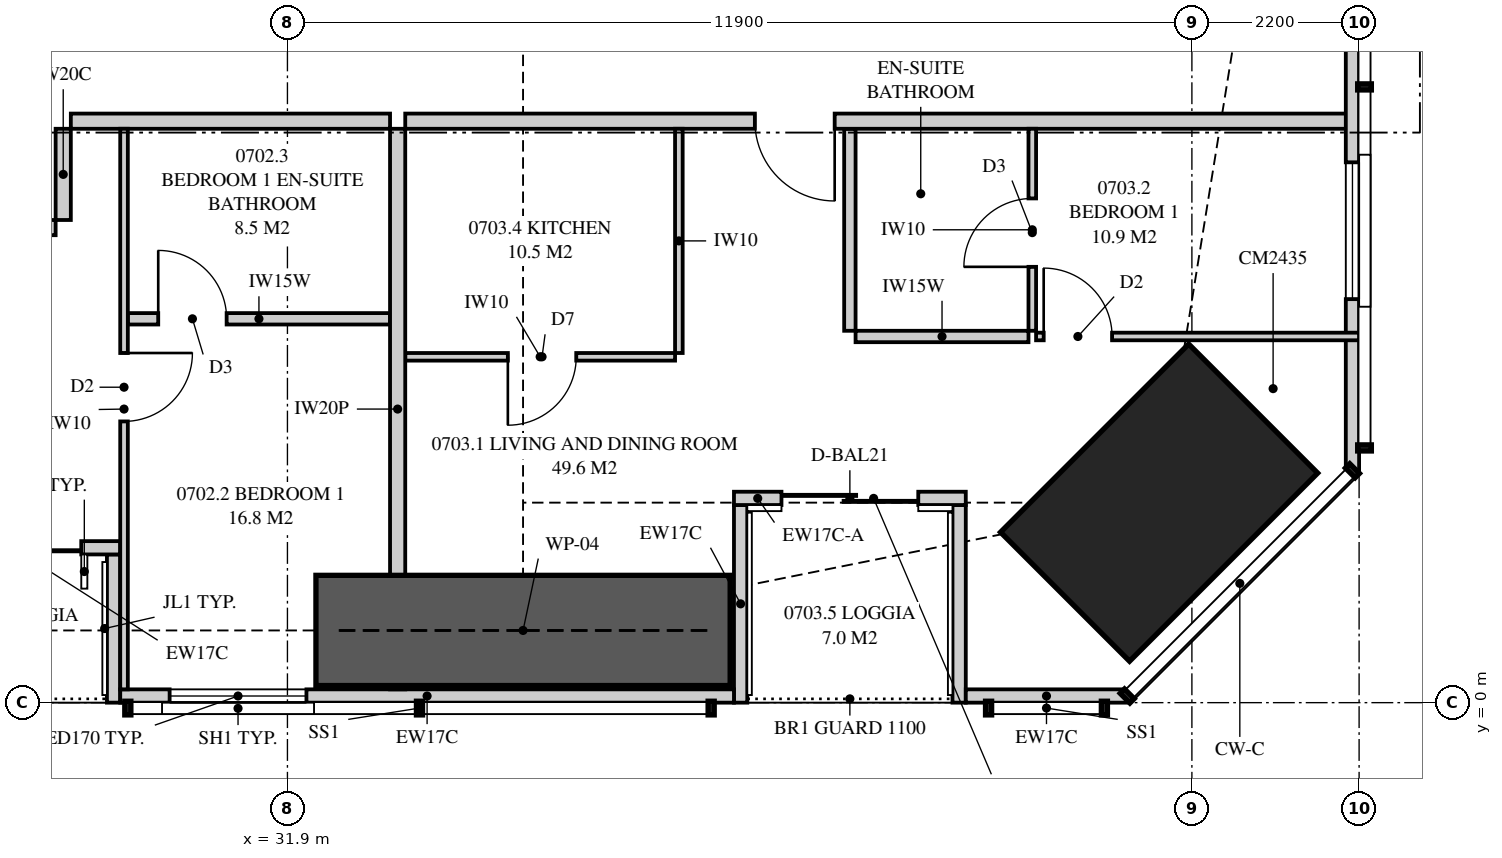
"""IFC4 building model, lengths in metres.
Left out: names, types, materials, properties, quantities, classifications, styles, units other than length and angle.
Written with IfcOpenShell. Run it as: python <this file> out.ifc"""

import sys

from ifc_helpers import new_model, si_unit, direction, frame, frame_2d, origin, origin_2d, place, context, subcontext, project, spatial, polyline, rectangle, outline, extrude, element, fill, save


model = new_model("IFC4")
c1 = context("Model", 3, precision=1e-05, world=origin(), true_north=direction((0.0, 1.0)))
c2 = subcontext(c1, "Body", "Model", "MODEL_VIEW")
j1 = project(units=[si_unit("LENGTHUNIT", "METRE"), si_unit("PLANEANGLEUNIT", "RADIAN")], contexts=[c1])
p1 = place(None, origin())
s1 = spatial("IfcSite", under=j1, at=p1, CompositionType="ELEMENT")
p2 = place(p1, origin())
s2 = spatial("IfcBuilding", under=s1, at=p2, CompositionType="ELEMENT")
p3 = place(p2, frame((0.0, 0.0, 31.05)))
s3 = spatial("IfcBuildingStorey", under=s2, at=p3, CompositionType="ELEMENT", Elevation=31.05)
p4 = place(p3, frame((43.369, 2.631, 0.0), z_axis=(0.0, 0.0, 1.0), x_axis=(-0.707106781187, 0.707106781187, 0.0)))
e1 = element("IfcColumn", 1, at=p4, inside=s3, PredefinedType="COLUMN", context=c2, shape_type="SweptSolid", body=[
    extrude(rectangle(XDim=2.4, YDim=3.5, at=origin_2d()), origin(), (0.0, 0.0, 1.0), 3.35),
])
p5 = place(p3, frame((29.7, 0.087, 0.0), z_axis=(0.0, 0.0, 1.0), x_axis=(1.0, 0.0, 0.0)))
e2 = element("IfcWall", 2, at=p5, inside=s3, PredefinedType="SOLIDWALL", context=c2, shape_type="SweptSolid", body=[
    extrude(outline(polyline([(0.0, 0.0), (8.075, 0.0), (8.075, 3.11), (5.504, 3.11), (5.504, 2.15), (5.456, 2.15), (5.456, 3.11), (5.3, 3.11), (5.3, 2.15), (0.0, 2.15), (0.0, 0.0)])), frame((0.0, 0.087, 0.0), z_axis=(0.0, -1.0, 0.0), x_axis=(1.0, 0.0, 0.0)), (0.0, 0.0, 1.0), 0.175),
])
p6 = place(p5, frame((0.65, 0.0, 0.4)))
e3 = element("IfcOpeningElement", 3, at=p6, cuts=e2, PredefinedType="OPENING", context=c2, shape_type="SweptSolid", body=[
    extrude(rectangle(XDim=1.8, YDim=1.7, at=frame_2d((0.9, 0.85))), frame((0.0, 0.097, 0.0), z_axis=(0.0, -1.0, 0.0), x_axis=(1.0, 0.0, 0.0)), (0.0, 0.0, 1.0), 0.195),
])
p7 = place(p3, frame((40.825, 0.087, 0.0), z_axis=(0.0, 0.0, 1.0), x_axis=(1.0, 0.0, 0.0)))
e4 = element("IfcWall", 4, at=p7, inside=s3, PredefinedType="SOLIDWALL", context=c2, shape_type="SweptSolid", body=[
    extrude(rectangle(XDim=2.124, YDim=0.175, at=frame_2d((1.062, 0.0))), origin(), (0.0, 0.0, 1.0), 3.11),
])
p8 = place(p3, frame((26.875, 2.038, 0.0), z_axis=(0.0, 0.0, 1.0), x_axis=(1.0, 0.0, 0.0)))
e5 = element("IfcWall", 5, at=p8, inside=s3, PredefinedType="SOLIDWALL", context=c2, shape_type="SweptSolid", body=[
    extrude(rectangle(XDim=2.825, YDim=0.175, at=frame_2d((1.413, 0.0))), origin(), (0.0, 0.0, 1.0), 3.11),
])
p9 = place(p8, frame((0.512, 0.0, 0.0)))
e6 = element("IfcOpeningElement", 6, at=p9, cuts=e5, PredefinedType="OPENING", context=c2, shape_type="SweptSolid", body=[
    extrude(rectangle(XDim=1.8, YDim=2.1, at=frame_2d((0.9, 1.05))), frame((0.0, 0.097, 0.0), z_axis=(0.0, -1.0, 0.0), x_axis=(1.0, 0.0, 0.0)), (0.0, 0.0, 1.0), 0.195),
])
p10 = place(p3, frame((29.613, 0.0, 0.0), z_axis=(0.0, 0.0, 1.0), x_axis=(0.0, 1.0, 0.0)))
e7 = element("IfcWall", 7, at=p10, inside=s3, PredefinedType="SOLIDWALL", context=c2, shape_type="SweptSolid", body=[
    extrude(outline(polyline([(0.0, 0.0), (1.95, 0.0), (1.95, 3.11), (1.75, 3.11), (1.75, 2.15), (0.15, 2.15), (0.15, 3.11), (0.0, 3.11), (0.0, 0.0)])), frame((0.0, 0.087, 0.0), z_axis=(0.0, -1.0, 0.0), x_axis=(1.0, 0.0, 0.0)), (0.0, 0.0, 1.0), 0.175),
])
p11 = place(p3, frame((37.775, 2.688, 0.0), z_axis=(0.0, 0.0, 1.0), x_axis=(1.0, 0.0, 0.0)))
e8 = element("IfcWall", 8, at=p11, inside=s3, PredefinedType="SOLIDWALL", context=c2, shape_type="SweptSolid", body=[
    extrude(rectangle(XDim=0.625, YDim=0.175, at=frame_2d((0.312, 0.0))), origin(), (0.0, 0.0, 1.0), 2.51),
])
p12 = place(p3, frame((38.4, 2.688, 0.0), z_axis=(0.0, 0.0, 1.0), x_axis=(1.0, 0.0, 0.0)))
e9 = element("IfcWall", 9, at=p12, inside=s3, PredefinedType="SOLIDWALL", context=c2, shape_type="SweptSolid", body=[
    extrude(rectangle(XDim=2.425, YDim=0.175, at=frame_2d((1.212, 0.0))), origin(), (0.0, 0.0, 1.0), 2.15),
])
p13 = place(p12, origin())
e10 = element("IfcOpeningElement", 10, at=p13, cuts=e9, PredefinedType="OPENING", context=c2, shape_type="SweptSolid", body=[
    extrude(rectangle(XDim=1.8, YDim=2.1, at=frame_2d((0.9, 1.05))), frame((0.0, 0.097, 0.0), z_axis=(0.0, -1.0, 0.0), x_axis=(1.0, 0.0, 0.0)), (0.0, 0.0, 1.0), 0.195),
])
p14 = place(p3, frame((37.863, 0.0, 0.0), z_axis=(0.0, 0.0, 1.0), x_axis=(0.0, 1.0, 0.0)))
e11 = element("IfcWall", 11, at=p14, inside=s3, PredefinedType="SOLIDWALL", context=c2, shape_type="SweptSolid", body=[
    extrude(outline(polyline([(0.0, 0.0), (2.6, 0.0), (2.6, 2.51), (2.359, 2.51), (2.359, 2.15), (0.692, 2.15), (0.692, 3.11), (0.0, 3.11), (0.0, 0.0)])), frame((0.0, 0.087, 0.0), z_axis=(0.0, -1.0, 0.0), x_axis=(1.0, 0.0, 0.0)), (0.0, 0.0, 1.0), 0.175),
])
p15 = place(p3, frame((40.738, 0.0, 0.0), z_axis=(0.0, 0.0, 1.0), x_axis=(0.0, 1.0, 0.0)))
e12 = element("IfcWall", 12, at=p15, inside=s3, PredefinedType="SOLIDWALL", context=c2, shape_type="SweptSolid", body=[
    extrude(outline(polyline([(0.0, 0.0), (2.6, 0.0), (2.6, 2.15), (1.269, 2.15), (1.269, 3.11), (0.0, 3.11), (0.0, 0.0)])), frame((0.0, 0.087, 0.0), z_axis=(0.0, -1.0, 0.0), x_axis=(1.0, 0.0, 0.0)), (0.0, 0.0, 1.0), 0.175),
])
p16 = place(p3, frame((45.913, 3.051, 0.0), z_axis=(0.0, 0.0, 1.0), x_axis=(0.0, 1.0, 0.0)))
e13 = element("IfcWall", 13, at=p16, inside=s3, PredefinedType="SOLIDWALL", context=c2, shape_type="SweptSolid", body=[
    extrude(outline(polyline([(0.0, 0.0), (31.897, 0.0), (31.897, 3.11), (22.167, 3.11), (22.167, 2.15), (22.074, 2.15), (22.074, 3.11), (21.949, 3.11), (21.949, 2.15), (9.949, 2.15), (9.949, 3.11), (9.823, 3.11), (9.823, 2.15), (9.73, 2.15), (9.73, 3.11), (0.0, 3.11), (0.0, 0.0)])), frame((0.0, 0.087, 0.0), z_axis=(0.0, -1.0, 0.0), x_axis=(1.0, 0.0, 0.0)), (0.0, 0.0, 1.0), 0.175),
])
p17 = place(p16, frame((2.257, 0.0, 0.4)))
e14 = element("IfcOpeningElement", 14, at=p17, cuts=e13, PredefinedType="OPENING", context=c2, shape_type="SweptSolid", body=[
    extrude(rectangle(XDim=1.8, YDim=1.7, at=frame_2d((0.9, 0.85))), frame((0.0, 0.097, 0.0), z_axis=(0.0, -1.0, 0.0), x_axis=(1.0, 0.0, 0.0)), (0.0, 0.0, 1.0), 0.195),
])
p18 = place(p16, frame((14.849, 0.0, 0.4)))
e15 = element("IfcOpeningElement", 15, at=p18, cuts=e13, PredefinedType="OPENING", context=c2, shape_type="SweptSolid", body=[
    extrude(rectangle(XDim=1.2, YDim=1.7, at=frame_2d((0.6, 0.85))), frame((0.0, 0.097, 0.0), z_axis=(0.0, -1.0, 0.0), x_axis=(1.0, 0.0, 0.0)), (0.0, 0.0, 1.0), 0.195),
])
p19 = place(p16, frame((27.34, 0.0, 0.4)))
e16 = element("IfcOpeningElement", 16, at=p19, cuts=e13, PredefinedType="OPENING", context=c2, shape_type="SweptSolid", body=[
    extrude(rectangle(XDim=1.8, YDim=1.7, at=frame_2d((0.9, 0.85))), frame((0.0, 0.097, 0.0), z_axis=(0.0, -1.0, 0.0), x_axis=(1.0, 0.0, 0.0)), (0.0, 0.0, 1.0), 0.195),
])
p20 = place(p3, frame((33.35, 0.175, 0.0), z_axis=(0.0, 0.0, 1.0), x_axis=(0.0, 1.0, 0.0)))
e17 = element("IfcWall", 17, at=p20, inside=s3, PredefinedType="PARTITIONING", context=c2, shape_type="SweptSolid", body=[
    extrude(outline(polyline([(0.529, 2.15), (0.0, 2.15), (0.0, 0.0), (0.529, 0.0), (0.529, 0.366), (1.021, 0.366), (1.021, 0.0), (7.375, 0.0), (7.375, 3.11), (1.685, 3.11), (1.685, 2.15), (1.021, 2.15), (1.021, 1.784), (0.529, 1.784), (0.529, 2.15)])), frame((0.0, 0.1, 0.0), z_axis=(0.0, -1.0, 0.0), x_axis=(1.0, 0.0, 0.0)), (0.0, 0.0, 1.0), 0.2),
])
p21 = place(p3, frame((29.75, 0.175, 0.0), z_axis=(0.0, 0.0, 1.0), x_axis=(0.0, 1.0, 0.0)))
e18 = element("IfcWall", 18, at=p21, inside=s3, PredefinedType="PARTITIONING", context=c2, shape_type="SweptSolid", body=[
    extrude(outline(polyline([(0.0, 0.0), (7.375, 0.0), (7.375, 3.11), (1.635, 3.11), (1.635, 2.15), (0.0, 2.15), (0.0, 3.11), (0.0, 0.0)])), frame((0.0, 0.05, 0.0), z_axis=(0.0, -1.0, 0.0), x_axis=(1.0, 0.0, 0.0)), (0.0, 0.0, 1.0), 0.1),
])
p22 = place(p21, frame((3.525, 0.0, 0.0)))
e19 = element("IfcOpeningElement", 19, at=p22, cuts=e18, PredefinedType="OPENING", context=c2, shape_type="SweptSolid", body=[
    extrude(rectangle(XDim=0.9, YDim=2.1, at=frame_2d((0.45, 1.05))), frame((0.0, 0.06, 0.0), z_axis=(0.0, -1.0, 0.0), x_axis=(1.0, 0.0, 0.0)), (0.0, 0.0, 1.0), 0.12),
])
p23 = place(p3, frame((29.8, 5.05, 0.0), z_axis=(0.0, 0.0, 1.0), x_axis=(1.0, 0.0, 0.0)))
e20 = element("IfcWall", 20, at=p23, inside=s3, PredefinedType="PLUMBINGWALL", context=c2, shape_type="SweptSolid", body=[
    extrude(rectangle(XDim=3.45, YDim=0.15, at=frame_2d((1.725, 0.0))), origin(), (0.0, 0.0, 1.0), 3.11),
])
p24 = place(p23, frame((0.4, 0.0, 0.0)))
e21 = element("IfcOpeningElement", 21, at=p24, cuts=e20, PredefinedType="OPENING", context=c2, shape_type="SweptSolid", body=[
    extrude(rectangle(XDim=0.9, YDim=2.1, at=frame_2d((0.45, 1.05))), frame((0.0, 0.085, 0.0), z_axis=(0.0, -1.0, 0.0), x_axis=(1.0, 0.0, 0.0)), (0.0, 0.0, 1.0), 0.17),
])
p25 = place(p3, frame((33.45, 7.65, 0.0), z_axis=(0.0, 0.0, 1.0), x_axis=(1.0, 0.0, 0.0)))
e22 = element("IfcWall", 22, at=p25, inside=s3, PredefinedType="PARTITIONING", context=c2, shape_type="SweptSolid", body=[
    extrude(outline(polyline([(0.0, 0.0), (12.55, 0.0), (12.55, 3.11), (11.654, 3.11), (11.654, 2.15), (9.811, 2.15), (9.811, 3.11), (1.887, 3.11), (1.887, 2.541), (1.213, 2.541), (1.213, 3.11), (0.0, 3.11), (0.0, 0.0)])), frame((0.0, 0.1, 0.0), z_axis=(0.0, -1.0, 0.0), x_axis=(1.0, 0.0, 0.0)), (0.0, 0.0, 1.0), 0.2),
])
p26 = place(p25, frame((4.6, 0.0, 0.0)))
e23 = element("IfcOpeningElement", 23, at=p26, cuts=e22, PredefinedType="OPENING", context=c2, shape_type="SweptSolid", body=[
    extrude(rectangle(XDim=1.05, YDim=2.2, at=frame_2d((0.525, 1.1))), frame((0.0, 0.11, 0.0), z_axis=(0.0, -1.0, 0.0), x_axis=(1.0, 0.0, 0.0)), (0.0, 0.0, 1.0), 0.22),
])
p27 = place(p3, frame((41.7, 4.892, 0.0), z_axis=(0.0, 0.0, 1.0), x_axis=(0.0, 1.0, 0.0)))
e24 = element("IfcWall", 24, at=p27, inside=s3, PredefinedType="PARTITIONING", context=c2, shape_type="SweptSolid", body=[
    extrude(rectangle(XDim=2.658, YDim=0.1, at=frame_2d((1.329, 0.0))), origin(), (0.0, 0.0, 1.0), 3.11),
])
p28 = place(p27, frame((0.841, 0.0, 0.0)))
e25 = element("IfcOpeningElement", 25, at=p28, cuts=e24, PredefinedType="OPENING", context=c2, shape_type="SweptSolid", body=[
    extrude(rectangle(XDim=0.9, YDim=2.1, at=frame_2d((0.45, 1.05))), frame((0.0, 0.06, 0.0), z_axis=(0.0, -1.0, 0.0), x_axis=(1.0, 0.0, 0.0)), (0.0, 0.0, 1.0), 0.12),
])
p29 = place(p3, frame((41.75, 4.817, 0.0), z_axis=(0.0, 0.0, 1.0), x_axis=(1.0, 0.0, 0.0)))
e26 = element("IfcWall", 26, at=p29, inside=s3, PredefinedType="PARTITIONING", context=c2, shape_type="SweptSolid", body=[
    extrude(outline(polyline([(0.0, 0.0), (4.25, 0.0), (4.25, 3.11), (2.844, 3.11), (2.844, 2.15), (1.102, 2.15), (1.102, 3.11), (0.0, 3.11), (0.0, 0.0)])), frame((0.0, 0.05, 0.0), z_axis=(0.0, -1.0, 0.0), x_axis=(1.0, 0.0, 0.0)), (0.0, 0.0, 1.0), 0.1),
])
p30 = place(p29, frame((0.1, 0.0, 0.0)))
e27 = element("IfcOpeningElement", 27, at=p30, cuts=e26, PredefinedType="OPENING", context=c2, shape_type="SweptSolid", body=[
    extrude(rectangle(XDim=0.9, YDim=2.1, at=frame_2d((0.45, 1.05))), frame((0.0, 0.06, 0.0), z_axis=(0.0, -1.0, 0.0), x_axis=(1.0, 0.0, 0.0)), (0.0, 0.0, 1.0), 0.12),
])
p31 = place(p3, frame((39.375, 4.817, 0.0), z_axis=(0.0, 0.0, 1.0), x_axis=(1.0, 0.0, 0.0)))
e28 = element("IfcWall", 28, at=p31, inside=s3, PredefinedType="PLUMBINGWALL", context=c2, shape_type="SweptSolid", body=[
    extrude(rectangle(XDim=2.275, YDim=0.15, at=frame_2d((1.137, 0.0))), origin(), (0.0, 0.0, 1.0), 3.11),
])
p32 = place(p3, frame((39.3, 4.892, 0.0), z_axis=(0.0, 0.0, 1.0), x_axis=(0.0, 1.0, 0.0)))
e29 = element("IfcWall", 29, at=p32, inside=s3, PredefinedType="PLUMBINGWALL", context=c2, shape_type="SweptSolid", body=[
    extrude(rectangle(XDim=2.658, YDim=0.15, at=frame_2d((1.329, 0.0))), origin(), (0.0, 0.0, 1.0), 3.11),
])
p33 = place(p3, frame((33.45, 4.55, 0.0), z_axis=(0.0, 0.0, 1.0), x_axis=(1.0, 0.0, 0.0)))
e30 = element("IfcWall", 30, at=p33, inside=s3, PredefinedType="PARTITIONING", context=c2, shape_type="SweptSolid", body=[
    extrude(outline(polyline([(0.0, 0.0), (3.55, 0.0), (3.55, 3.11), (1.837, 3.11), (1.837, 2.541), (1.263, 2.541), (1.263, 3.11), (0.0, 3.11), (0.0, 0.0)])), frame((0.0, 0.05, 0.0), z_axis=(0.0, -1.0, 0.0), x_axis=(1.0, 0.0, 0.0)), (0.0, 0.0, 1.0), 0.1),
])
p34 = place(p33, frame((1.35, 0.0, 0.0)))
e31 = element("IfcOpeningElement", 31, at=p34, cuts=e30, PredefinedType="OPENING", context=c2, shape_type="SweptSolid", body=[
    extrude(rectangle(XDim=0.9, YDim=2.1, at=frame_2d((0.45, 1.05))), frame((0.0, 0.06, 0.0), z_axis=(0.0, -1.0, 0.0), x_axis=(1.0, 0.0, 0.0)), (0.0, 0.0, 1.0), 0.12),
])
p35 = place(p3, frame((37.05, 4.6, 0.0), z_axis=(0.0, 0.0, 1.0), x_axis=(0.0, 1.0, 0.0)))
e32 = element("IfcWall", 32, at=p35, inside=s3, PredefinedType="PARTITIONING", context=c2, shape_type="SweptSolid", body=[
    extrude(rectangle(XDim=2.95, YDim=0.1, at=frame_2d((1.475, 0.0))), origin(), (0.0, 0.0, 1.0), 3.11),
])
p36 = place(p3, frame((29.05, 7.65, 0.0), z_axis=(0.0, 0.0, 1.0), x_axis=(1.0, 0.0, 0.0)))
e33 = element("IfcWall", 33, at=p36, inside=s3, PredefinedType="PARTITIONING", context=c2, shape_type="SweptSolid", body=[
    extrude(rectangle(XDim=4.2, YDim=0.2, at=frame_2d((2.1, 0.0))), origin(), (0.0, 0.0, 1.0), 3.11),
])
p37 = place(p3, frame((26.45, 6.25, 0.0), z_axis=(0.0, 0.0, 1.0), x_axis=(1.0, 0.0, 0.0)))
e34 = element("IfcWall", 34, at=p37, inside=s3, PredefinedType="PARTITIONING", context=c2, shape_type="SweptSolid", body=[
    extrude(rectangle(XDim=2.4, YDim=0.2, at=frame_2d((1.2, 0.0))), origin(), (0.0, 0.0, 1.0), 3.11),
])
p38 = place(p37, frame((0.7, 0.0, 0.0)))
e35 = element("IfcOpeningElement", 35, at=p38, cuts=e34, PredefinedType="OPENING", context=c2, shape_type="SweptSolid", body=[
    extrude(rectangle(XDim=1.05, YDim=2.2, at=frame_2d((0.525, 1.1))), frame((0.0, 0.11, 0.0), z_axis=(0.0, -1.0, 0.0), x_axis=(1.0, 0.0, 0.0)), (0.0, 0.0, 1.0), 0.22),
])
p39 = place(p3, frame((28.95, 7.55, 0.0), z_axis=(0.0, 0.0, 1.0), x_axis=(0.0, -1.0, 0.0)))
e36 = element("IfcWall", 36, at=p39, inside=s3, PredefinedType="PARTITIONING", context=c2, shape_type="SweptSolid", body=[
    extrude(rectangle(XDim=1.2, YDim=0.2, at=frame_2d((0.6, 0.0))), origin(), (0.0, 0.0, 1.0), 3.11),
])
p40 = place(p3, frame((32.275, 0.95, 0.0), z_axis=(0.0, 0.0, 1.0), x_axis=(1.0, 0.0, 0.0)))
e37 = element("IfcWall", 37, at=p40, inside=s3, PredefinedType="SHEAR", context=c2, shape_type="SweptSolid", body=[
    extrude(rectangle(XDim=5.45, YDim=1.45, at=frame_2d((2.725, 0.0))), origin(), (0.0, 0.0, 1.0), 3.35),
])
p41 = place(p9, origin())
e38 = element("IfcDoor", 38, at=p41, inside=s3, OperationType="SLIDING_TO_LEFT", PredefinedType="DOOR", context=c2, shape_type="SweptSolid", body=[
    extrude(rectangle(XDim=1.8, YDim=2.1, at=frame_2d((0.9, 1.05))), frame((0.0, 0.025, 0.0), z_axis=(0.0, -1.0, 0.0), x_axis=(1.0, 0.0, 0.0)), (0.0, 0.0, 1.0), 0.05),
])
fill(e6, e38)
p42 = place(p6, origin())
e39 = element("IfcWindow", 39, at=p42, inside=s3, PartitioningType="SINGLE_PANEL", PredefinedType="WINDOW", context=c2, shape_type="SweptSolid", body=[
    extrude(rectangle(XDim=1.8, YDim=1.7, at=frame_2d((0.9, 0.85))), frame((0.0, 0.03, 0.0), z_axis=(0.0, -1.0, 0.0), x_axis=(1.0, 0.0, 0.0)), (0.0, 0.0, 1.0), 0.06),
])
fill(e3, e39)
p43 = place(p13, origin())
e40 = element("IfcDoor", 40, at=p43, inside=s3, OperationType="SLIDING_TO_LEFT", PredefinedType="DOOR", context=c2, shape_type="SweptSolid", body=[
    extrude(rectangle(XDim=1.8, YDim=2.1, at=frame_2d((0.9, 1.05))), frame((0.0, 0.025, 0.0), z_axis=(0.0, -1.0, 0.0), x_axis=(1.0, 0.0, 0.0)), (0.0, 0.0, 1.0), 0.05),
])
fill(e10, e40)
p44 = place(p17, origin())
e41 = element("IfcWindow", 41, at=p44, inside=s3, PartitioningType="SINGLE_PANEL", PredefinedType="WINDOW", context=c2, shape_type="SweptSolid", body=[
    extrude(rectangle(XDim=1.8, YDim=1.7, at=frame_2d((0.9, 0.85))), frame((0.0, 0.03, 0.0), z_axis=(0.0, -1.0, 0.0), x_axis=(1.0, 0.0, 0.0)), (0.0, 0.0, 1.0), 0.06),
])
fill(e14, e41)
p45 = place(p22, frame((0.9, 0.0, 0.0), z_axis=(0.0, 0.0, 1.0), x_axis=(-1.0, 0.0, 0.0)))
e42 = element("IfcDoor", 42, at=p45, inside=s3, OperationType="SINGLE_SWING_LEFT", PredefinedType="DOOR", context=c2, shape_type="SweptSolid", body=[
    extrude(rectangle(XDim=0.9, YDim=2.1, at=frame_2d((0.45, 1.05))), frame((0.0, 0.025, 0.0), z_axis=(0.0, -1.0, 0.0), x_axis=(1.0, 0.0, 0.0)), (0.0, 0.0, 1.0), 0.05),
])
fill(e19, e42)
p46 = place(p24, origin())
e43 = element("IfcDoor", 43, at=p46, inside=s3, OperationType="SINGLE_SWING_LEFT", PredefinedType="DOOR", context=c2, shape_type="SweptSolid", body=[
    extrude(rectangle(XDim=0.9, YDim=2.1, at=frame_2d((0.45, 1.05))), frame((0.0, 0.025, 0.0), z_axis=(0.0, -1.0, 0.0), x_axis=(1.0, 0.0, 0.0)), (0.0, 0.0, 1.0), 0.05),
])
fill(e21, e43)
p47 = place(p26, frame((1.05, 0.0, 0.0), z_axis=(0.0, 0.0, 1.0), x_axis=(-1.0, 0.0, 0.0)))
e44 = element("IfcDoor", 44, at=p47, inside=s3, OperationType="SINGLE_SWING_LEFT", PredefinedType="DOOR", context=c2, shape_type="SweptSolid", body=[
    extrude(rectangle(XDim=1.05, YDim=2.2, at=frame_2d((0.525, 1.1))), frame((0.0, 0.025, 0.0), z_axis=(0.0, -1.0, 0.0), x_axis=(1.0, 0.0, 0.0)), (0.0, 0.0, 1.0), 0.05),
])
fill(e23, e44)
p48 = place(p30, origin())
e45 = element("IfcDoor", 45, at=p48, inside=s3, OperationType="SINGLE_SWING_LEFT", PredefinedType="DOOR", context=c2, shape_type="SweptSolid", body=[
    extrude(rectangle(XDim=0.9, YDim=2.1, at=frame_2d((0.45, 1.05))), frame((0.0, 0.025, 0.0), z_axis=(0.0, -1.0, 0.0), x_axis=(1.0, 0.0, 0.0)), (0.0, 0.0, 1.0), 0.05),
])
fill(e27, e45)
p49 = place(p28, origin())
e46 = element("IfcDoor", 46, at=p49, inside=s3, OperationType="SINGLE_SWING_LEFT", PredefinedType="DOOR", context=c2, shape_type="SweptSolid", body=[
    extrude(rectangle(XDim=0.9, YDim=2.1, at=frame_2d((0.45, 1.05))), frame((0.0, 0.025, 0.0), z_axis=(0.0, -1.0, 0.0), x_axis=(1.0, 0.0, 0.0)), (0.0, 0.0, 1.0), 0.05),
])
fill(e25, e46)
p50 = place(p34, frame((0.9, 0.0, 0.0), z_axis=(0.0, 0.0, 1.0), x_axis=(-1.0, 0.0, 0.0)))
e47 = element("IfcDoor", 47, at=p50, inside=s3, OperationType="SINGLE_SWING_RIGHT", PredefinedType="DOOR", context=c2, shape_type="SweptSolid", body=[
    extrude(rectangle(XDim=0.9, YDim=2.1, at=frame_2d((0.45, 1.05))), frame((0.0, 0.025, 0.0), z_axis=(0.0, -1.0, 0.0), x_axis=(1.0, 0.0, 0.0)), (0.0, 0.0, 1.0), 0.05),
])
fill(e31, e47)
save(model, sys.argv[1])
